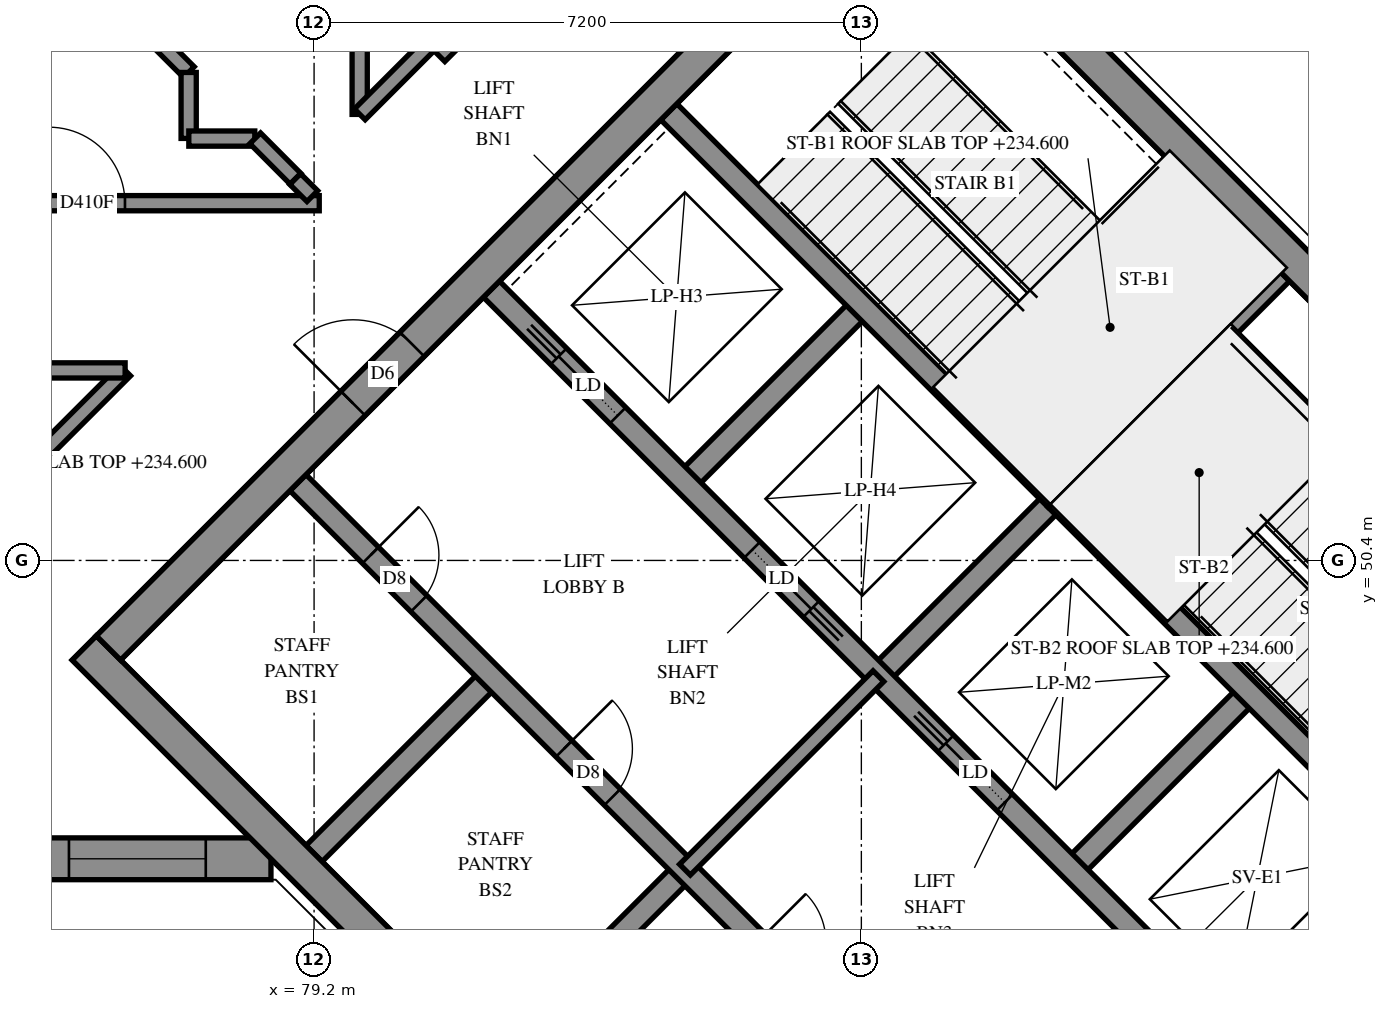
"""IFC4 building model, lengths in metres.
Left out: names, types, materials, properties, quantities, classifications, styles, units other than length and angle.
Written with IfcOpenShell. Run it as: python <this file> out.ifc"""

import sys

from ifc_helpers import new_model, si_unit, direction, frame, frame_2d, origin, place, context, subcontext, project, spatial, polyline, rectangle, outline, extrude, element, fill, save


model = new_model("IFC4")
c1 = context("Model", 3, precision=1e-05, world=origin(), true_north=direction((0.0, 1.0)))
c2 = subcontext(c1, "Body", "Model", "MODEL_VIEW")
j1 = project(units=[si_unit("LENGTHUNIT", "METRE"), si_unit("PLANEANGLEUNIT", "RADIAN")], contexts=[c1])
p1 = place(None, origin())
s1 = spatial("IfcSite", under=j1, at=p1, CompositionType="ELEMENT")
p2 = place(p1, origin())
s2 = spatial("IfcBuilding", under=s1, at=p2, CompositionType="ELEMENT")
p3 = place(p2, frame((0.0, 0.0, 234.6)))
s3 = spatial("IfcBuildingStorey", under=s2, at=p3, CompositionType="ELEMENT", Elevation=234.6)
for number, where, z_axis, x_axis in (
    (1, (76.177, 49.249, -0.3), (0.0, 0.0, 1.0), (0.707, -0.707, 0.0)),
    (2, (86.678, 59.749, -0.3), (0.0, 0.0, 1.0), (0.707, -0.707, 0.0)),
):
    element("IfcWall", number, at=place(p3, frame(where, z_axis=z_axis, x_axis=x_axis)), inside=s3, PredefinedType="SHEAR", context=c2, shape_type="SweptSolid", body=[
        extrude(rectangle(XDim=15.3, YDim=0.45, at=frame_2d((7.65, 0.0))), origin(), (0.0, 0.0, 1.0), 4.3),
    ])
p4 = place(p3, frame((76.495, 49.249, -0.3), z_axis=(0.0, 0.0, 1.0), x_axis=(0.7071067812, 0.7071067812, 0.0)))
e3 = element("IfcWall", 3, at=p4, inside=s3, PredefinedType="SHEAR", context=c2, shape_type="SweptSolid", body=[
    extrude(rectangle(XDim=14.4, YDim=0.45, at=frame_2d((7.2, 0.0))), origin(), (0.0, 0.0, 1.0), 4.3),
])
p5 = place(p4, frame((4.55, 0.0, 0.3)))
e4 = element("IfcOpeningElement", 4, at=p5, cuts=e3, PredefinedType="OPENING", context=c2, shape_type="SweptSolid", body=[
    extrude(rectangle(XDim=1.1, YDim=2.1, at=frame_2d((0.55, 1.05))), frame((0.0, 0.235, 0.0), z_axis=(0.0, -1.0, 0.0), x_axis=(1.0, 0.0, 0.0)), (0.0, 0.0, 1.0), 0.47),
])
p6 = place(p4, frame((11.35, 0.0, 0.3)))
e5 = element("IfcOpeningElement", 5, at=p6, cuts=e3, PredefinedType="OPENING", context=c2, shape_type="SweptSolid", body=[
    extrude(rectangle(XDim=1.1, YDim=2.1, at=frame_2d((0.55, 1.05))), frame((0.0, 0.235, 0.0), z_axis=(0.0, -1.0, 0.0), x_axis=(1.0, 0.0, 0.0)), (0.0, 0.0, 1.0), 0.47),
])
p7 = place(p3, frame((86.996, 38.748, -0.3), z_axis=(0.0, 0.0, 1.0), x_axis=(0.7071067812, 0.7071067812, 0.0)))
e6 = element("IfcWall", 6, at=p7, inside=s3, PredefinedType="SHEAR", context=c2, shape_type="SweptSolid", body=[
    extrude(rectangle(XDim=14.4, YDim=0.45, at=frame_2d((7.2, 0.0))), origin(), (0.0, 0.0, 1.0), 4.3),
])
p8 = place(p7, frame((4.55, 0.0, 0.3)))
e7 = element("IfcOpeningElement", 7, at=p8, cuts=e6, PredefinedType="OPENING", context=c2, shape_type="SweptSolid", body=[
    extrude(rectangle(XDim=1.1, YDim=2.1, at=frame_2d((0.55, 1.05))), frame((0.0, 0.235, 0.0), z_axis=(0.0, -1.0, 0.0), x_axis=(1.0, 0.0, 0.0)), (0.0, 0.0, 1.0), 0.47),
])
p9 = place(p7, frame((11.35, 0.0, 0.3)))
e8 = element("IfcOpeningElement", 8, at=p9, cuts=e6, PredefinedType="OPENING", context=c2, shape_type="SweptSolid", body=[
    extrude(rectangle(XDim=1.1, YDim=2.1, at=frame_2d((0.55, 1.05))), frame((0.0, 0.235, 0.0), z_axis=(0.0, -1.0, 0.0), x_axis=(1.0, 0.0, 0.0)), (0.0, 0.0, 1.0), 0.47),
])
for number, where, z_axis, x_axis in (
    (9, (79.2, 46.544, 0.0), (0.0, 0.0, 1.0), (0.707, 0.707, 0.0)),
    (10, (84.079, 51.423, 0.0), (0.0, 0.0, 1.0), (0.707, 0.707, 0.0)),
):
    element("IfcWall", number, at=place(p3, frame(where, z_axis=z_axis, x_axis=x_axis)), inside=s3, PredefinedType="SOLIDWALL", context=c2, shape_type="SweptSolid", body=[
        extrude(rectangle(XDim=3.3, YDim=0.3, at=frame_2d((1.65, 0.0))), origin(), (0.0, 0.0, 1.0), 4.7),
    ])
p10 = place(p3, frame((81.746, 43.999, 0.0), z_axis=(0.0, 0.0, 1.0), x_axis=(0.7071067812, 0.7071067812, 0.0)))
e11 = element("IfcWall", 11, at=p10, inside=s3, PredefinedType="SOLIDWALL", context=c2, shape_type="SweptSolid", body=[
    extrude(rectangle(XDim=3.3, YDim=0.3, at=frame_2d((1.65, 0.0))), origin(), (0.0, 0.0, 1.0), 4.7),
])
for number, where, z_axis, x_axis in (
    (12, (86.625, 48.878, 0.0), (0.0, 0.0, 1.0), (0.707, 0.707, 0.0)),
    (13, (89.17, 46.332, 0.0), (0.0, 0.0, 1.0), (0.707, 0.707, 0.0)),
):
    element("IfcWall", number, at=place(p3, frame(where, z_axis=z_axis, x_axis=x_axis)), inside=s3, PredefinedType="SOLIDWALL", context=c2, shape_type="SweptSolid", body=[
        extrude(rectangle(XDim=3.3, YDim=0.3, at=frame_2d((1.65, 0.0))), origin(), (0.0, 0.0, 1.0), 4.7),
    ])
p11 = place(p3, frame((78.988, 51.423, 0.0), z_axis=(0.0, 0.0, 1.0), x_axis=(0.7071067812, -0.7071067812, 0.0)))
e14 = element("IfcWall", 14, at=p11, inside=s3, PredefinedType="SOLIDWALL", context=c2, shape_type="SweptSolid", body=[
    extrude(rectangle(XDim=14.4, YDim=0.3, at=frame_2d((7.2, 0.0))), origin(), (0.0, 0.0, 1.0), 4.7),
])
p12 = place(p11, frame((1.35, 0.0, 0.0)))
e15 = element("IfcOpeningElement", 15, at=p12, cuts=e14, PredefinedType="OPENING", context=c2, shape_type="SweptSolid", body=[
    extrude(rectangle(XDim=0.9, YDim=2.1, at=frame_2d((0.45, 1.05))), frame((0.0, 0.16, 0.0), z_axis=(0.0, -1.0, 0.0), x_axis=(1.0, 0.0, 0.0)), (0.0, 0.0, 1.0), 0.32),
])
p13 = place(p11, frame((4.95, 0.0, 0.0)))
e16 = element("IfcOpeningElement", 16, at=p13, cuts=e14, PredefinedType="OPENING", context=c2, shape_type="SweptSolid", body=[
    extrude(rectangle(XDim=0.9, YDim=2.1, at=frame_2d((0.45, 1.05))), frame((0.0, 0.16, 0.0), z_axis=(0.0, -1.0, 0.0), x_axis=(1.0, 0.0, 0.0)), (0.0, 0.0, 1.0), 0.32),
])
p14 = place(p11, frame((8.55, 0.0, 0.0)))
e17 = element("IfcOpeningElement", 17, at=p14, cuts=e14, PredefinedType="OPENING", context=c2, shape_type="SweptSolid", body=[
    extrude(rectangle(XDim=0.9, YDim=2.1, at=frame_2d((0.45, 1.05))), frame((0.0, 0.16, 0.0), z_axis=(0.0, -1.0, 0.0), x_axis=(1.0, 0.0, 0.0)), (0.0, 0.0, 1.0), 0.32),
])
p15 = place(p11, frame((12.05, 0.0, 0.0)))
e18 = element("IfcOpeningElement", 18, at=p15, cuts=e14, PredefinedType="OPENING", context=c2, shape_type="SweptSolid", body=[
    extrude(rectangle(XDim=1.1, YDim=2.1, at=frame_2d((0.55, 1.05))), frame((0.0, 0.16, 0.0), z_axis=(0.0, -1.0, 0.0), x_axis=(1.0, 0.0, 0.0)), (0.0, 0.0, 1.0), 0.32),
])
p16 = place(p3, frame((81.534, 53.969, 0.0), z_axis=(0.0, 0.0, 1.0), x_axis=(0.707103309, -0.7071102534, 0.0)))
e19 = element("IfcWall", 19, at=p16, inside=s3, PredefinedType="SOLIDWALL", context=c2, shape_type="SweptSolid", body=[
    extrude(rectangle(XDim=14.4, YDim=0.3, at=frame_2d((7.2, 0.0))), origin(), (0.0, 0.0, 1.0), 4.7),
])
p17 = place(p16, frame((1.25, 0.0, 0.0)))
e20 = element("IfcOpeningElement", 20, at=p17, cuts=e19, PredefinedType="OPENING", context=c2, shape_type="SweptSolid", body=[
    extrude(rectangle(XDim=1.1, YDim=2.1, at=frame_2d((0.55, 1.05))), frame((0.0, 0.16, 0.0), z_axis=(0.0, -1.0, 0.0), x_axis=(1.0, 0.0, 0.0)), (0.0, 0.0, 1.0), 0.32),
])
p18 = place(p16, frame((4.85, 0.0, 0.0)))
e21 = element("IfcOpeningElement", 21, at=p18, cuts=e19, PredefinedType="OPENING", context=c2, shape_type="SweptSolid", body=[
    extrude(rectangle(XDim=1.1, YDim=2.1, at=frame_2d((0.55, 1.05))), frame((0.0, 0.16, 0.0), z_axis=(0.0, -1.0, 0.0), x_axis=(1.0, 0.0, 0.0)), (0.0, 0.0, 1.0), 0.32),
])
p19 = place(p16, frame((8.45, 0.0, 0.0)))
e22 = element("IfcOpeningElement", 22, at=p19, cuts=e19, PredefinedType="OPENING", context=c2, shape_type="SweptSolid", body=[
    extrude(rectangle(XDim=1.1, YDim=2.1, at=frame_2d((0.55, 1.05))), frame((0.0, 0.16, 0.0), z_axis=(0.0, -1.0, 0.0), x_axis=(1.0, 0.0, 0.0)), (0.0, 0.0, 1.0), 0.32),
])
p20 = place(p16, frame((12.05, 0.0, 0.0)))
e23 = element("IfcOpeningElement", 23, at=p20, cuts=e19, PredefinedType="OPENING", context=c2, shape_type="SweptSolid", body=[
    extrude(rectangle(XDim=1.1, YDim=2.1, at=frame_2d((0.55, 1.05))), frame((0.0, 0.16, 0.0), z_axis=(0.0, -1.0, 0.0), x_axis=(1.0, 0.0, 0.0)), (0.0, 0.0, 1.0), 0.32),
])
for number, where, z_axis, x_axis in (
    (24, (83.867, 56.302, 0.0), (0.0, 0.0, 1.0), (0.707, -0.707, 0.0)),
    (25, (88.958, 51.211, 0.0), (0.0, 0.0, 1.0), (0.707, -0.707, 0.0)),
):
    element("IfcWall", number, at=place(p3, frame(where, z_axis=z_axis, x_axis=x_axis)), inside=s3, PredefinedType="SOLIDWALL", context=c2, shape_type="SweptSolid", body=[
        extrude(rectangle(XDim=7.2, YDim=0.3, at=frame_2d((3.6, 0.0))), origin(), (0.0, 0.0, 1.0), 4.7),
    ])
p21 = place(p3, frame((88.958, 51.211, 0.0), z_axis=(0.0, 0.0, 1.0), x_axis=(0.7071067812, 0.7071067812, 0.0)))
e26 = element("IfcWall", 26, at=p21, inside=s3, PredefinedType="SOLIDWALL", context=c2, shape_type="SweptSolid", body=[
    extrude(rectangle(XDim=4.2, YDim=0.3, at=frame_2d((2.1, 0.0))), origin(), (0.0, 0.0, 1.0), 4.7),
])
p22 = place(p3, frame((53.675, 46.475, 0.0), z_axis=(0.0, 0.0, 1.0), x_axis=(1.0, 0.0, 0.0)))
e27 = element("IfcWall", 27, at=p22, inside=s3, PredefinedType="SOLIDWALL", context=c2, shape_type="SweptSolid", body=[
    extrude(outline(polyline([(-0.275, -0.275), (24.958, -0.275), (24.958, 0.275), (0.275, 0.275), (-0.275, -0.275)])), origin(), (0.0, 0.0, 1.0), 4.7),
])
p23 = place(p22, frame((1.3, 0.0, 0.9)))
e28 = element("IfcOpeningElement", 28, at=p23, cuts=e27, PredefinedType="OPENING", context=c2, shape_type="SweptSolid", body=[
    extrude(rectangle(XDim=1.8, YDim=3.6, at=frame_2d((0.9, 1.8))), frame((0.0, 0.285, 0.0), z_axis=(0.0, -1.0, 0.0), x_axis=(1.0, 0.0, 0.0)), (0.0, 0.0, 1.0), 0.57),
])
p24 = place(p22, frame((4.825, 0.0, 0.9)))
e29 = element("IfcOpeningElement", 29, at=p24, cuts=e27, PredefinedType="OPENING", context=c2, shape_type="SweptSolid", body=[
    extrude(rectangle(XDim=1.8, YDim=3.6, at=frame_2d((0.9, 1.8))), frame((0.0, 0.285, 0.0), z_axis=(0.0, -1.0, 0.0), x_axis=(1.0, 0.0, 0.0)), (0.0, 0.0, 1.0), 0.57),
])
p25 = place(p22, frame((8.425, 0.0, 0.9)))
e30 = element("IfcOpeningElement", 30, at=p25, cuts=e27, PredefinedType="OPENING", context=c2, shape_type="SweptSolid", body=[
    extrude(rectangle(XDim=1.8, YDim=3.6, at=frame_2d((0.9, 1.8))), frame((0.0, 0.285, 0.0), z_axis=(0.0, -1.0, 0.0), x_axis=(1.0, 0.0, 0.0)), (0.0, 0.0, 1.0), 0.57),
])
p26 = place(p22, frame((12.025, 0.0, 0.9)))
e31 = element("IfcOpeningElement", 31, at=p26, cuts=e27, PredefinedType="OPENING", context=c2, shape_type="SweptSolid", body=[
    extrude(rectangle(XDim=1.8, YDim=3.6, at=frame_2d((0.9, 1.8))), frame((0.0, 0.285, 0.0), z_axis=(0.0, -1.0, 0.0), x_axis=(1.0, 0.0, 0.0)), (0.0, 0.0, 1.0), 0.57),
])
p27 = place(p22, frame((15.625, 0.0, 0.9)))
e32 = element("IfcOpeningElement", 32, at=p27, cuts=e27, PredefinedType="OPENING", context=c2, shape_type="SweptSolid", body=[
    extrude(rectangle(XDim=1.8, YDim=3.6, at=frame_2d((0.9, 1.8))), frame((0.0, 0.285, 0.0), z_axis=(0.0, -1.0, 0.0), x_axis=(1.0, 0.0, 0.0)), (0.0, 0.0, 1.0), 0.57),
])
p28 = place(p22, frame((19.225, 0.0, 0.9)))
e33 = element("IfcOpeningElement", 33, at=p28, cuts=e27, PredefinedType="OPENING", context=c2, shape_type="SweptSolid", body=[
    extrude(rectangle(XDim=1.8, YDim=3.6, at=frame_2d((0.9, 1.8))), frame((0.0, 0.285, 0.0), z_axis=(0.0, -1.0, 0.0), x_axis=(1.0, 0.0, 0.0)), (0.0, 0.0, 1.0), 0.57),
])
p29 = place(p22, frame((22.3, 0.0, 0.9)))
e34 = element("IfcOpeningElement", 34, at=p29, cuts=e27, PredefinedType="OPENING", context=c2, shape_type="SweptSolid", body=[
    extrude(rectangle(XDim=1.8, YDim=3.6, at=frame_2d((0.9, 1.8))), frame((0.0, 0.285, 0.0), z_axis=(0.0, -1.0, 0.0), x_axis=(1.0, 0.0, 0.0)), (0.0, 0.0, 1.0), 0.57),
])
p30 = place(p3, frame((102.747, 49.938, 0.0), z_axis=(0.0, 0.0, 1.0), x_axis=(-0.7071083109, 0.7071052514, 0.0)))
e35 = element("IfcWall", 35, at=p30, inside=s3, PredefinedType="SOLIDWALL", context=c2, shape_type="SweptSolid", body=[
    extrude(outline(polyline([(-0.1, -0.1), (32.726, -0.1), (32.644, 0.1), (0.1, 0.1), (-0.1, -0.1)])), origin(), (0.0, 0.0, 1.0), 4.7),
])
p31 = place(p3, frame((84.079, 46.332, 0.0), z_axis=(0.0, 0.0, 1.0), x_axis=(0.7071067812, 0.7071067812, 0.0)))
e36 = element("IfcWall", 36, at=p31, inside=s3, PredefinedType="PARTITIONING", context=c2, shape_type="SweptSolid", body=[
    extrude(rectangle(XDim=3.6, YDim=0.2, at=frame_2d((1.8, 0.0))), origin(), (0.0, 0.0, 1.0), 4.7),
])
p32 = place(p3, frame((80.85, 57.034, 0.0), z_axis=(0.0, 0.0, 1.0), x_axis=(0.7071067812, 0.7071067812, 0.0)))
e37 = element("IfcWall", 37, at=p32, inside=s3, PredefinedType="PARTITIONING", context=c2, shape_type="SweptSolid", body=[
    extrude(rectangle(XDim=5.866, YDim=0.2, at=frame_2d((2.933, 0.0))), origin(), (0.0, 0.0, 1.0), 4.7),
])
p33 = place(p32, frame((0.839, 0.0, 0.0)))
e38 = element("IfcOpeningElement", 38, at=p33, cuts=e37, PredefinedType="OPENING", context=c2, shape_type="SweptSolid", body=[
    extrude(rectangle(XDim=1.0, YDim=2.1, at=frame_2d((0.5, 1.05))), frame((0.0, 0.11, 0.0), z_axis=(0.0, -1.0, 0.0), x_axis=(1.0, 0.0, 0.0)), (0.0, 0.0, 1.0), 0.22),
])
p34 = place(p3, frame((74.652, 55.1, 0.0), z_axis=(0.0, 0.0, 1.0), x_axis=(1.0, 0.0, 0.0)))
e39 = element("IfcWall", 39, at=p34, inside=s3, PredefinedType="PARTITIONING", context=c2, shape_type="SweptSolid", body=[
    extrude(rectangle(XDim=4.616, YDim=0.2, at=frame_2d((2.308, 0.0))), origin(), (0.0, 0.0, 1.0), 4.7),
])
p35 = place(p34, frame((1.06, 0.0, 0.0)))
e40 = element("IfcOpeningElement", 40, at=p35, cuts=e39, PredefinedType="OPENING", context=c2, shape_type="SweptSolid", body=[
    extrude(rectangle(XDim=1.0, YDim=2.1, at=frame_2d((0.5, 1.05))), frame((0.0, 0.11, 0.0), z_axis=(0.0, -1.0, 0.0), x_axis=(1.0, 0.0, 0.0)), (0.0, 0.0, 1.0), 0.22),
])
p36 = place(p3, frame((79.8, 56.268, 0.0), z_axis=(0.0, 0.0, 1.0), x_axis=(0.0, 1.0, 0.0)))
e41 = element("IfcWall", 41, at=p36, inside=s3, PredefinedType="PARTITIONING", context=c2, shape_type="SweptSolid", body=[
    extrude(rectangle(XDim=2.982, YDim=0.2, at=frame_2d((1.491, 0.0))), origin(), (0.0, 0.0, 1.0), 4.7),
])
p37 = place(p3, frame((74.651, 50.835, 0.0), z_axis=(0.0, 0.0, 1.0), x_axis=(0.7071067812, 0.7071067812, 0.0)))
e42 = element("IfcWall", 42, at=p37, inside=s3, PredefinedType="PARTITIONING", context=c2, shape_type="SweptSolid", body=[
    extrude(rectangle(XDim=2.919, YDim=0.2, at=frame_2d((1.459, 0.0))), origin(), (0.0, 0.0, 1.0), 4.7),
])
p38 = place(p3, frame((75.878, 58.496, 0.0), z_axis=(0.0, 0.0, 1.0), x_axis=(0.7075293128, -0.706683997, 0.0)))
e43 = element("IfcWall", 43, at=p38, inside=s3, PredefinedType="PARTITIONING", context=c2, shape_type="SweptSolid", body=[
    extrude(rectangle(XDim=2.366, YDim=0.2, at=frame_2d((1.183, 0.0))), origin(), (0.0, 0.0, 1.0), 4.7),
])
p39 = place(p3, frame((74.652, 52.9, 0.0), z_axis=(0.0, 0.0, 1.0), x_axis=(1.0, 0.0, 0.0)))
e44 = element("IfcWall", 44, at=p39, inside=s3, PredefinedType="PARTITIONING", context=c2, shape_type="SweptSolid", body=[
    extrude(rectangle(XDim=2.062, YDim=0.2, at=frame_2d((1.031, 0.0))), origin(), (0.0, 0.0, 1.0), 4.7),
])
p40 = place(p3, frame((79.801, 56.269, 0.0), z_axis=(0.0, 0.0, 1.0), x_axis=(0.7071067812, 0.7071067812, 0.0)))
e45 = element("IfcWall", 45, at=p40, inside=s3, PredefinedType="PARTITIONING", context=c2, shape_type="SweptSolid", body=[
    extrude(rectangle(XDim=1.482, YDim=0.2, at=frame_2d((0.741, 0.0))), origin(), (0.0, 0.0, 1.0), 4.7),
])
for number, where, z_axis, x_axis in (
    (46, (77.55, 55.952, 0.0), (0.0, 0.0, 1.0), (0.0, 1.0, 0.0)),
    (47, (77.552, 55.95, 0.0), (0.0, 0.0, 1.0), (1.0, 0.0, 0.0)),
):
    element("IfcWall", number, at=place(p3, frame(where, z_axis=z_axis, x_axis=x_axis)), inside=s3, PredefinedType="PARTITIONING", context=c2, shape_type="SweptSolid", body=[
        extrude(rectangle(XDim=0.868, YDim=0.2, at=frame_2d((0.434, 0.0))), origin(), (0.0, 0.0, 1.0), 4.7),
    ])
p41 = place(p3, frame((78.425, 55.953, 0.0), z_axis=(0.0, 0.0, 1.0), x_axis=(0.7057738785, -0.7084371761, 0.0)))
e48 = element("IfcWall", 48, at=p41, inside=s3, PredefinedType="PARTITIONING", context=c2, shape_type="SweptSolid", body=[
    extrude(rectangle(XDim=0.751, YDim=0.2, at=frame_2d((0.376, 0.0))), origin(), (0.0, 0.0, 1.0), 4.7),
])
p42 = place(p3, frame((78.951, 55.417, 0.0), z_axis=(0.0, 0.0, 1.0), x_axis=(0.709302262, -0.7049044624, 0.0)))
e49 = element("IfcWall", 49, at=p42, inside=s3, PredefinedType="PARTITIONING", context=c2, shape_type="SweptSolid", body=[
    extrude(rectangle(XDim=0.318, YDim=0.2, at=frame_2d((0.159, 0.0))), origin(), (0.0, 0.0, 1.0), 4.7),
])
p43 = place(p29, origin())
e50 = element("IfcWindow", 50, at=p43, inside=s3, PartitioningType="SINGLE_PANEL", PredefinedType="WINDOW", context=c2, shape_type="SweptSolid", body=[
    extrude(rectangle(XDim=1.8, YDim=3.6, at=frame_2d((0.9, 1.8))), frame((0.0, 0.155, 0.0), z_axis=(0.0, -1.0, 0.0), x_axis=(1.0, 0.0, 0.0)), (0.0, 0.0, 1.0), 0.06),
])
fill(e34, e50)
p44 = place(p5, origin())
e51 = element("IfcDoor", 51, at=p44, inside=s3, OperationType="DOUBLE_DOOR_SINGLE_SWING", PredefinedType="DOOR", context=c2, shape_type="SweptSolid", body=[
    extrude(rectangle(XDim=1.1, YDim=2.1, at=frame_2d((0.55, 1.05))), frame((0.0, 0.025, 0.0), z_axis=(0.0, -1.0, 0.0), x_axis=(1.0, 0.0, 0.0)), (0.0, 0.0, 1.0), 0.05),
])
fill(e4, e51)
p45 = place(p12, origin())
e52 = element("IfcDoor", 52, at=p45, inside=s3, OperationType="SINGLE_SWING_LEFT", PredefinedType="DOOR", context=c2, shape_type="SweptSolid", body=[
    extrude(rectangle(XDim=0.9, YDim=2.1, at=frame_2d((0.45, 1.05))), frame((0.0, 0.025, 0.0), z_axis=(0.0, -1.0, 0.0), x_axis=(1.0, 0.0, 0.0)), (0.0, 0.0, 1.0), 0.05),
])
fill(e15, e52)
p46 = place(p13, origin())
e53 = element("IfcDoor", 53, at=p46, inside=s3, OperationType="SINGLE_SWING_LEFT", PredefinedType="DOOR", context=c2, shape_type="SweptSolid", body=[
    extrude(rectangle(XDim=0.9, YDim=2.1, at=frame_2d((0.45, 1.05))), frame((0.0, 0.025, 0.0), z_axis=(0.0, -1.0, 0.0), x_axis=(1.0, 0.0, 0.0)), (0.0, 0.0, 1.0), 0.05),
])
fill(e16, e53)
p47 = place(p17, origin())
e54 = element("IfcDoor", 54, at=p47, inside=s3, OperationType="SLIDING_TO_LEFT", PredefinedType="DOOR", context=c2, shape_type="SweptSolid", body=[
    extrude(rectangle(XDim=1.1, YDim=2.1, at=frame_2d((0.55, 1.05))), frame((0.0, 0.025, 0.0), z_axis=(0.0, -1.0, 0.0), x_axis=(1.0, 0.0, 0.0)), (0.0, 0.0, 1.0), 0.05),
])
fill(e20, e54)
p48 = place(p18, origin())
e55 = element("IfcDoor", 55, at=p48, inside=s3, OperationType="SLIDING_TO_RIGHT", PredefinedType="DOOR", context=c2, shape_type="SweptSolid", body=[
    extrude(rectangle(XDim=1.1, YDim=2.1, at=frame_2d((0.55, 1.05))), frame((0.0, 0.025, 0.0), z_axis=(0.0, -1.0, 0.0), x_axis=(1.0, 0.0, 0.0)), (0.0, 0.0, 1.0), 0.05),
])
fill(e21, e55)
p49 = place(p19, origin())
e56 = element("IfcDoor", 56, at=p49, inside=s3, OperationType="SLIDING_TO_LEFT", PredefinedType="DOOR", context=c2, shape_type="SweptSolid", body=[
    extrude(rectangle(XDim=1.1, YDim=2.1, at=frame_2d((0.55, 1.05))), frame((0.0, 0.025, 0.0), z_axis=(0.0, -1.0, 0.0), x_axis=(1.0, 0.0, 0.0)), (0.0, 0.0, 1.0), 0.05),
])
fill(e22, e56)
p50 = place(p35, origin())
e57 = element("IfcDoor", 57, at=p50, inside=s3, OperationType="SINGLE_SWING_LEFT", PredefinedType="DOOR", context=c2, shape_type="SweptSolid", body=[
    extrude(rectangle(XDim=1.0, YDim=2.1, at=frame_2d((0.5, 1.05))), frame((0.0, 0.025, 0.0), z_axis=(0.0, -1.0, 0.0), x_axis=(1.0, 0.0, 0.0)), (0.0, 0.0, 1.0), 0.05),
])
fill(e40, e57)
save(model, sys.argv[1])
